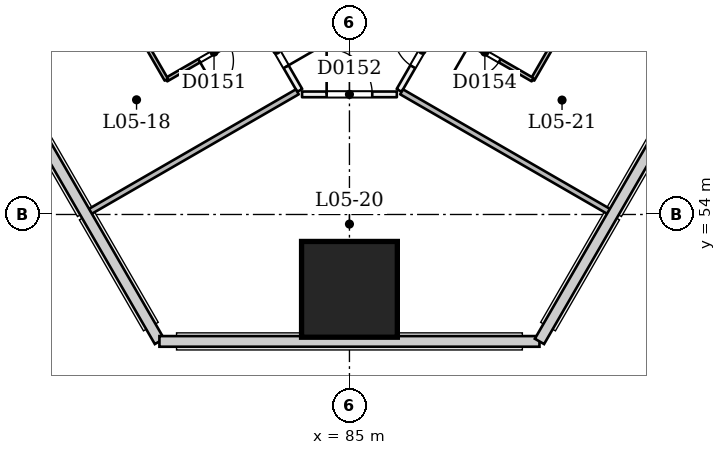
"""IFC4 building model, lengths in metres.
Left out: names, types, materials, properties, quantities, classifications, styles, units other than length and angle.
Written with IfcOpenShell. Run it as: python <this file> out.ifc"""

import sys

from ifc_helpers import new_model, si_unit, direction, frame, frame_2d, origin, origin_2d, place, context, subcontext, project, spatial, rectangle, extrude, element, fill, save


model = new_model("IFC4")
c1 = context("Model", 3, precision=1e-05, world=origin(), true_north=direction((0.0, 1.0)))
c2 = subcontext(c1, "Body", "Model", "MODEL_VIEW")
j1 = project(units=[si_unit("LENGTHUNIT", "METRE"), si_unit("PLANEANGLEUNIT", "RADIAN")], contexts=[c1])
p1 = place(None, origin())
s1 = spatial("IfcSite", under=j1, at=p1, CompositionType="ELEMENT")
p2 = place(p1, origin())
s2 = spatial("IfcBuilding", under=s1, at=p2, CompositionType="ELEMENT")
p3 = place(p2, frame((0.0, 0.0, 27.0)))
s3 = spatial("IfcBuildingStorey", under=s2, at=p3, CompositionType="ELEMENT", Elevation=27.0)
p4 = place(p3, frame((85.0, 51.96, 0.0), z_axis=(0.0, 0.058356907999, 0.998295783467), x_axis=(-1.0, 0.0, 0.0)))
e1 = element("IfcColumn", 1, at=p4, inside=s3, PredefinedType="COLUMN", context=c2, shape_type="SweptSolid", body=[
    extrude(rectangle(XDim=2.52, YDim=2.52, at=origin_2d()), origin(), (0.0, 0.0, 1.0), 3.606),
])
p5 = place(p3, frame((61.193, 96.236, 0.0), z_axis=(0.0, 0.0, 1.0), x_axis=(0.49999953585, -0.866025671762, 0.0)))
e2 = element("IfcWall", 2, at=p5, inside=s3, PredefinedType="PARTITIONING", context=c2, shape_type="SweptSolid", body=[
    extrude(rectangle(XDim=45.0, YDim=0.15, at=frame_2d((22.5, 0.0))), origin(), (0.0, 0.0, 1.0), 2.7),
])
p6 = place(p5, frame((1.75, 0.0, 0.0)))
e3 = element("IfcOpeningElement", 3, at=p6, cuts=e2, PredefinedType="OPENING", context=c2, shape_type="SweptSolid", body=[
    extrude(rectangle(XDim=1.0, YDim=2.1, at=frame_2d((0.5, 1.05))), frame((0.0, 0.085, 0.0), z_axis=(0.0, -1.0, 0.0), x_axis=(1.0, 0.0, 0.0)), (0.0, 0.0, 1.0), 0.171),
])
p7 = place(p5, frame((7.3, 0.0, 0.0)))
e4 = element("IfcOpeningElement", 4, at=p7, cuts=e2, PredefinedType="OPENING", context=c2, shape_type="SweptSolid", body=[
    extrude(rectangle(XDim=1.2, YDim=2.1, at=frame_2d((0.6, 1.05))), frame((0.0, 0.085, 0.0), z_axis=(0.0, -1.0, 0.0), x_axis=(1.0, 0.0, 0.0)), (0.0, 0.0, 1.0), 0.171),
])
p8 = place(p5, frame((14.071, 0.0, 0.0)))
e5 = element("IfcOpeningElement", 5, at=p8, cuts=e2, PredefinedType="OPENING", context=c2, shape_type="SweptSolid", body=[
    extrude(rectangle(XDim=1.1, YDim=2.1, at=frame_2d((0.55, 1.05))), frame((0.0, 0.085, 0.0), z_axis=(0.0, -1.0, 0.0), x_axis=(1.0, 0.0, 0.0)), (0.0, 0.0, 1.0), 0.171),
])
p9 = place(p5, frame((20.78, 0.0, 0.0)))
e6 = element("IfcOpeningElement", 6, at=p9, cuts=e2, PredefinedType="OPENING", context=c2, shape_type="SweptSolid", body=[
    extrude(rectangle(XDim=1.0, YDim=2.1, at=frame_2d((0.5, 1.05))), frame((0.0, 0.085, 0.0), z_axis=(0.0, -1.0, 0.0), x_axis=(1.0, 0.0, 0.0)), (0.0, 0.0, 1.0), 0.171),
])
p10 = place(p5, frame((23.105, 0.0, 0.0)))
e7 = element("IfcOpeningElement", 7, at=p10, cuts=e2, PredefinedType="OPENING", context=c2, shape_type="SweptSolid", body=[
    extrude(rectangle(XDim=1.0, YDim=2.1, at=frame_2d((0.5, 1.05))), frame((0.0, 0.085, 0.0), z_axis=(0.0, -1.0, 0.0), x_axis=(1.0, 0.0, 0.0)), (0.0, 0.0, 1.0), 0.171),
])
p11 = place(p5, frame((28.75, 0.0, 0.0)))
e8 = element("IfcOpeningElement", 8, at=p11, cuts=e2, PredefinedType="OPENING", context=c2, shape_type="SweptSolid", body=[
    extrude(rectangle(XDim=1.0, YDim=2.1, at=frame_2d((0.5, 1.05))), frame((0.0, 0.085, 0.0), z_axis=(0.0, -1.0, 0.0), x_axis=(1.0, 0.0, 0.0)), (0.0, 0.0, 1.0), 0.171),
])
p12 = place(p5, frame((34.3, 0.0, 0.0)))
e9 = element("IfcOpeningElement", 9, at=p12, cuts=e2, PredefinedType="OPENING", context=c2, shape_type="SweptSolid", body=[
    extrude(rectangle(XDim=1.2, YDim=2.1, at=frame_2d((0.6, 1.05))), frame((0.0, 0.085, 0.0), z_axis=(0.0, -1.0, 0.0), x_axis=(1.0, 0.0, 0.0)), (0.0, 0.0, 1.0), 0.171),
])
p13 = place(p5, frame((43.28, 0.0, 0.0)))
e10 = element("IfcOpeningElement", 10, at=p13, cuts=e2, PredefinedType="OPENING", context=c2, shape_type="SweptSolid", body=[
    extrude(rectangle(XDim=1.0, YDim=2.1, at=frame_2d((0.5, 1.05))), frame((0.0, 0.085, 0.0), z_axis=(0.0, -1.0, 0.0), x_axis=(1.0, 0.0, 0.0)), (0.0, 0.0, 1.0), 0.171),
])
p14 = place(p3, frame((83.753, 57.16, 0.0), z_axis=(0.0, 0.0, 1.0), x_axis=(1.0, 0.0, 0.0)))
e11 = element("IfcWall", 11, at=p14, inside=s3, PredefinedType="PARTITIONING", context=c2, shape_type="SweptSolid", body=[
    extrude(rectangle(XDim=2.495, YDim=0.15, at=frame_2d((1.247, 0.0))), origin(), (0.0, 0.0, 1.0), 3.1),
])
p15 = place(p14, frame((0.647, 0.0, 0.0)))
e12 = element("IfcOpeningElement", 12, at=p15, cuts=e11, PredefinedType="OPENING", context=c2, shape_type="SweptSolid", body=[
    extrude(rectangle(XDim=1.2, YDim=2.1, at=frame_2d((0.6, 1.05))), frame((0.0, 0.085, 0.0), z_axis=(0.0, -1.0, 0.0), x_axis=(1.0, 0.0, 0.0)), (0.0, 0.0, 1.0), 0.171),
])
p16 = place(p3, frame((86.307, 57.264, 0.0), z_axis=(0.0, 0.0, 1.0), x_axis=(0.500000579958, 0.866025068945, 0.0)))
e13 = element("IfcWall", 13, at=p16, inside=s3, PredefinedType="PARTITIONING", context=c2, shape_type="SweptSolid", body=[
    extrude(rectangle(XDim=40.5, YDim=0.15, at=frame_2d((20.25, 0.0))), origin(), (0.0, 0.0, 1.0), 2.7),
])
p17 = place(p16, frame((0.72, 0.0, 0.0)))
e14 = element("IfcOpeningElement", 14, at=p17, cuts=e13, PredefinedType="OPENING", context=c2, shape_type="SweptSolid", body=[
    extrude(rectangle(XDim=1.0, YDim=2.1, at=frame_2d((0.5, 1.05))), frame((0.0, 0.085, 0.0), z_axis=(0.0, -1.0, 0.0), x_axis=(1.0, 0.0, 0.0)), (0.0, 0.0, 1.0), 0.171),
])
p18 = place(p16, frame((5.22, 0.0, 0.0)))
e15 = element("IfcOpeningElement", 15, at=p18, cuts=e13, PredefinedType="OPENING", context=c2, shape_type="SweptSolid", body=[
    extrude(rectangle(XDim=1.0, YDim=2.1, at=frame_2d((0.5, 1.05))), frame((0.0, 0.085, 0.0), z_axis=(0.0, -1.0, 0.0), x_axis=(1.0, 0.0, 0.0)), (0.0, 0.0, 1.0), 0.171),
])
p19 = place(p16, frame((11.78, 0.0, 0.0)))
e16 = element("IfcOpeningElement", 16, at=p19, cuts=e13, PredefinedType="OPENING", context=c2, shape_type="SweptSolid", body=[
    extrude(rectangle(XDim=1.0, YDim=2.1, at=frame_2d((0.5, 1.05))), frame((0.0, 0.085, 0.0), z_axis=(0.0, -1.0, 0.0), x_axis=(1.0, 0.0, 0.0)), (0.0, 0.0, 1.0), 0.171),
])
p20 = place(p16, frame((14.22, 0.0, 0.0)))
e17 = element("IfcOpeningElement", 17, at=p20, cuts=e13, PredefinedType="OPENING", context=c2, shape_type="SweptSolid", body=[
    extrude(rectangle(XDim=1.0, YDim=2.1, at=frame_2d((0.5, 1.05))), frame((0.0, 0.085, 0.0), z_axis=(0.0, -1.0, 0.0), x_axis=(1.0, 0.0, 0.0)), (0.0, 0.0, 1.0), 0.171),
])
p21 = place(p16, frame((19.75, 0.0, 0.0)))
e18 = element("IfcOpeningElement", 18, at=p21, cuts=e13, PredefinedType="OPENING", context=c2, shape_type="SweptSolid", body=[
    extrude(rectangle(XDim=1.0, YDim=2.1, at=frame_2d((0.5, 1.05))), frame((0.0, 0.085, 0.0), z_axis=(0.0, -1.0, 0.0), x_axis=(1.0, 0.0, 0.0)), (0.0, 0.0, 1.0), 0.171),
])
p22 = place(p16, frame((23.22, 0.0, 0.0)))
e19 = element("IfcOpeningElement", 19, at=p22, cuts=e13, PredefinedType="OPENING", context=c2, shape_type="SweptSolid", body=[
    extrude(rectangle(XDim=1.0, YDim=2.1, at=frame_2d((0.5, 1.05))), frame((0.0, 0.085, 0.0), z_axis=(0.0, -1.0, 0.0), x_axis=(1.0, 0.0, 0.0)), (0.0, 0.0, 1.0), 0.171),
])
p23 = place(p16, frame((29.895, 0.0, 0.0)))
e20 = element("IfcOpeningElement", 20, at=p23, cuts=e13, PredefinedType="OPENING", context=c2, shape_type="SweptSolid", body=[
    extrude(rectangle(XDim=1.0, YDim=2.1, at=frame_2d((0.5, 1.05))), frame((0.0, 0.085, 0.0), z_axis=(0.0, -1.0, 0.0), x_axis=(1.0, 0.0, 0.0)), (0.0, 0.0, 1.0), 0.171),
])
p24 = place(p16, frame((32.105, 0.0, 0.0)))
e21 = element("IfcOpeningElement", 21, at=p24, cuts=e13, PredefinedType="OPENING", context=c2, shape_type="SweptSolid", body=[
    extrude(rectangle(XDim=1.0, YDim=2.1, at=frame_2d((0.5, 1.05))), frame((0.0, 0.085, 0.0), z_axis=(0.0, -1.0, 0.0), x_axis=(1.0, 0.0, 0.0)), (0.0, 0.0, 1.0), 0.171),
])
p25 = place(p16, frame((38.78, 0.0, 0.0)))
e22 = element("IfcOpeningElement", 22, at=p25, cuts=e13, PredefinedType="OPENING", context=c2, shape_type="SweptSolid", body=[
    extrude(rectangle(XDim=1.0, YDim=2.1, at=frame_2d((0.5, 1.05))), frame((0.0, 0.085, 0.0), z_axis=(0.0, -1.0, 0.0), x_axis=(1.0, 0.0, 0.0)), (0.0, 0.0, 1.0), 0.171),
])
p26 = place(p3, frame((75.883, 57.951, 0.0), z_axis=(0.0, 0.0, 1.0), x_axis=(0.866025401434, 0.500000004071, 0.0)))
e23 = element("IfcWall", 23, at=p26, inside=s3, PredefinedType="PARTITIONING", context=c2, shape_type="SweptSolid", body=[
    extrude(rectangle(XDim=6.345, YDim=0.1, at=frame_2d((3.173, 0.0))), origin(), (0.0, 0.0, 1.0), 2.6),
])
p27 = place(p3, frame((82.628, 58.959, 0.0), z_axis=(0.0, 0.0, 1.0), x_axis=(-0.866011447264, -0.500024172624, 0.0)))
e24 = element("IfcWall", 24, at=p27, inside=s3, PredefinedType="PARTITIONING", context=c2, shape_type="SweptSolid", body=[
    extrude(rectangle(XDim=2.825, YDim=0.1, at=frame_2d((1.413, 0.0))), origin(), (0.0, 0.0, 1.0), 3.1),
])
p28 = place(p27, frame((0.925, 0.0, 0.0)))
e25 = element("IfcOpeningElement", 25, at=p28, cuts=e24, PredefinedType="OPENING", context=c2, shape_type="SweptSolid", body=[
    extrude(rectangle(XDim=0.9, YDim=2.1, at=frame_2d((0.45, 1.05))), frame((0.0, 0.061, 0.0), z_axis=(0.0, -1.0, 0.0), x_axis=(1.0, 0.0, 0.0)), (0.0, 0.0, 1.0), 0.121),
])
p29 = place(p3, frame((80.181, 57.546, 0.0), z_axis=(0.0, 0.0, 1.0), x_axis=(-0.500018594424, 0.866014668023, 0.0)))
e26 = element("IfcWall", 26, at=p29, inside=s3, PredefinedType="PARTITIONING", context=c2, shape_type="SweptSolid", body=[
    extrude(rectangle(XDim=2.45, YDim=0.1, at=frame_2d((1.225, 0.0))), origin(), (0.0, 0.0, 1.0), 3.1),
])
p30 = place(p3, frame((78.133, 54.054, 0.0), z_axis=(0.0, 0.0, 1.0), x_axis=(0.866025401434, 0.500000004071, 0.0)))
e27 = element("IfcWall", 27, at=p30, inside=s3, PredefinedType="PARTITIONING", context=c2, shape_type="SweptSolid", body=[
    extrude(rectangle(XDim=6.345, YDim=0.15, at=frame_2d((3.173, 0.0))), origin(), (0.0, 0.0, 1.0), 2.6),
])
p31 = place(p3, frame((91.867, 54.054, 0.0), z_axis=(0.0, 0.0, 1.0), x_axis=(-0.866042062017, 0.499971145986, 0.0)))
e28 = element("IfcWall", 28, at=p31, inside=s3, PredefinedType="PARTITIONING", context=c2, shape_type="SweptSolid", body=[
    extrude(rectangle(XDim=6.345, YDim=0.15, at=frame_2d((3.172, 0.0))), origin(), (0.0, 0.0, 1.0), 2.6),
])
p32 = place(p3, frame((91.031, 59.646, 0.0), z_axis=(0.0, 0.0, 1.0), x_axis=(-0.499972286653, -0.866041403502, 0.0)))
e29 = element("IfcWall", 29, at=p32, inside=s3, PredefinedType="PARTITIONING", context=c2, shape_type="SweptSolid", body=[
    extrude(rectangle(XDim=2.425, YDim=0.1, at=frame_2d((1.212, 0.0))), origin(), (0.0, 0.0, 1.0), 3.1),
])
p33 = place(p3, frame((89.819, 57.546, 0.0), z_axis=(0.0, 0.0, 1.0), x_axis=(-0.866011447264, 0.500024172624, 0.0)))
e30 = element("IfcWall", 30, at=p33, inside=s3, PredefinedType="PARTITIONING", context=c2, shape_type="SweptSolid", body=[
    extrude(rectangle(XDim=2.825, YDim=0.1, at=frame_2d((1.413, 0.0))), origin(), (0.0, 0.0, 1.0), 3.1),
])
p34 = place(p33, frame((1.0, 0.0, 0.0)))
e31 = element("IfcOpeningElement", 31, at=p34, cuts=e30, PredefinedType="OPENING", context=c2, shape_type="SweptSolid", body=[
    extrude(rectangle(XDim=0.9, YDim=2.1, at=frame_2d((0.45, 1.05))), frame((0.0, 0.061, 0.0), z_axis=(0.0, -1.0, 0.0), x_axis=(1.0, 0.0, 0.0)), (0.0, 0.0, 1.0), 0.121),
])
p35 = place(p3, frame((94.117, 57.951, 0.0), z_axis=(0.0, 0.0, 1.0), x_axis=(-0.866036293601, 0.499981137809, 0.0)))
e32 = element("IfcWall", 32, at=p35, inside=s3, PredefinedType="PARTITIONING", context=c2, shape_type="SweptSolid", body=[
    extrude(rectangle(XDim=3.54, YDim=0.15, at=frame_2d((1.77, 0.0))), origin(), (0.0, 0.0, 1.0), 2.6),
])
p36 = place(p13, origin())
e33 = element("IfcDoor", 33, at=p36, inside=s3, OperationType="SINGLE_SWING_RIGHT", PredefinedType="NOTDEFINED", context=c2, shape_type="SweptSolid", body=[
    extrude(rectangle(XDim=1.0, YDim=2.1, at=frame_2d((0.5, 1.05))), frame((0.0, 0.025, 0.0), z_axis=(0.0, -1.0, 0.0), x_axis=(1.0, 0.0, 0.0)), (0.0, 0.0, 1.0), 0.05),
])
fill(e10, e33)
p37 = place(p28, origin())
e34 = element("IfcDoor", 34, at=p37, inside=s3, OperationType="SINGLE_SWING_RIGHT", PredefinedType="NOTDEFINED", context=c2, shape_type="SweptSolid", body=[
    extrude(rectangle(XDim=0.9, YDim=2.1, at=frame_2d((0.45, 1.05))), frame((0.0, 0.025, 0.0), z_axis=(0.0, -1.0, 0.0), x_axis=(1.0, 0.0, 0.0)), (0.0, 0.0, 1.0), 0.05),
])
fill(e25, e34)
p38 = place(p15, origin())
e35 = element("IfcDoor", 35, at=p38, inside=s3, OperationType="SINGLE_SWING_LEFT", PredefinedType="NOTDEFINED", context=c2, shape_type="SweptSolid", body=[
    extrude(rectangle(XDim=1.2, YDim=2.1, at=frame_2d((0.6, 1.05))), frame((0.0, 0.025, 0.0), z_axis=(0.0, -1.0, 0.0), x_axis=(1.0, 0.0, 0.0)), (0.0, 0.0, 1.0), 0.05),
])
fill(e12, e35)
p39 = place(p17, origin())
e36 = element("IfcDoor", 36, at=p39, inside=s3, OperationType="SINGLE_SWING_RIGHT", PredefinedType="NOTDEFINED", context=c2, shape_type="SweptSolid", body=[
    extrude(rectangle(XDim=1.0, YDim=2.1, at=frame_2d((0.5, 1.05))), frame((0.0, 0.025, 0.0), z_axis=(0.0, -1.0, 0.0), x_axis=(1.0, 0.0, 0.0)), (0.0, 0.0, 1.0), 0.05),
])
fill(e14, e36)
p40 = place(p34, origin())
e37 = element("IfcDoor", 37, at=p40, inside=s3, OperationType="SINGLE_SWING_RIGHT", PredefinedType="NOTDEFINED", context=c2, shape_type="SweptSolid", body=[
    extrude(rectangle(XDim=0.9, YDim=2.1, at=frame_2d((0.45, 1.05))), frame((0.0, 0.025, 0.0), z_axis=(0.0, -1.0, 0.0), x_axis=(1.0, 0.0, 0.0)), (0.0, 0.0, 1.0), 0.05),
])
fill(e31, e37)
save(model, sys.argv[1])
